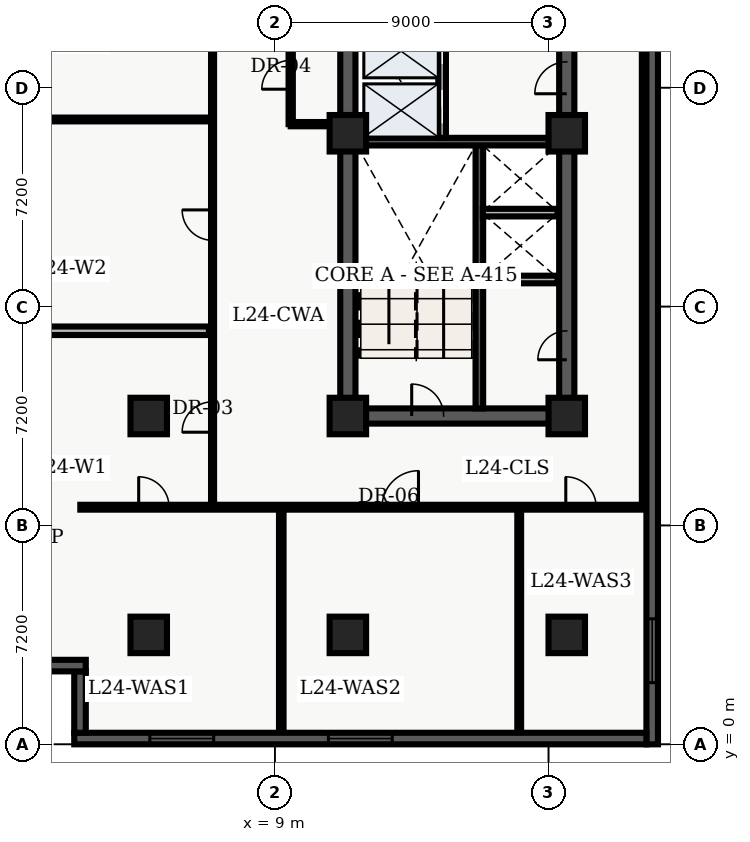
"""IFC4 building model, lengths in metres.
Left out: names, types, materials, properties, quantities, classifications, styles, units other than length and angle.
Written with IfcOpenShell. Run it as: python <this file> out.ifc"""

import sys

from ifc_helpers import new_model, entity, si_unit, converted_unit, direction, frame, origin_with_axes, origin_2d_with_axis, place, context, subcontext, project, spatial, polyline, rectangle, outline, extrude, element, fill, save


model = new_model("IFC4")
c1 = context("Model", 3, precision=1e-05, world=origin_with_axes(), true_north=direction((0.0, 1.0)))
c2 = subcontext(c1, "Body", "Model", "MODEL_VIEW")
j1 = project(units=[si_unit("LENGTHUNIT", "METRE"), converted_unit("PLANEANGLEUNIT", "DEGREE", entity("IfcPlaneAngleMeasure", 0.017), si_unit("PLANEANGLEUNIT", "RADIAN"), dimensions=[0, 0, 0, 0, 0, 0, 0])], contexts=[c1])
p1 = place(None, origin_with_axes())
s1 = spatial("IfcSite", under=j1, at=p1, CompositionType="ELEMENT")
p2 = place(p1, origin_with_axes())
s2 = spatial("IfcBuilding", under=s1, at=p2, CompositionType="ELEMENT")
p3 = place(p2, frame((0.0, 0.0, 100.8), z_axis=(0.0, 0.0, 1.0), x_axis=(1.0, 0.0, 0.0)))
s3 = spatial("IfcBuildingStorey", under=s2, at=p3, CompositionType="ELEMENT", Elevation=100.8)
p4 = place(p3, frame((11.4, 10.8, 0.0), z_axis=(0.0, 0.0, 1.0), x_axis=(0.0, 1.0, 0.0)))
e1 = element("IfcWall", 1, at=p4, inside=s3, PredefinedType="SHEAR", context=c2, shape_type="SweptSolid", body=[
    extrude(outline(polyline([(0.0, -0.25), (27.0, -0.25), (27.0, 0.25), (0.0, 0.25), (0.0, -0.25)])), origin_with_axes(), (0.0, 0.0, 1.0), 3.66),
])
p5 = place(p3, frame((11.4, 10.8, 0.0), z_axis=(0.0, 0.0, 1.0), x_axis=(1.0, 0.0, 0.0)))
e2 = element("IfcWall", 2, at=p5, inside=s3, PredefinedType="SHEAR", context=c2, shape_type="SweptSolid", body=[
    extrude(outline(polyline([(0.0, -0.25), (7.2, -0.25), (7.2, 0.25), (0.0, 0.25), (0.0, -0.25)])), origin_with_axes(), (0.0, 0.0, 1.0), 3.66),
])
p6 = place(p5, frame((2.625, 0.0, 0.0), z_axis=(0.0, 0.0, 1.0), x_axis=(1.0, 0.0, 0.0)))
e3 = element("IfcOpeningElement", 3, at=p6, cuts=e2, PredefinedType="OPENING", context=c2, shape_type="SweptSolid", body=[
    extrude(rectangle(XDim=1.05, YDim=0.52, at=origin_2d_with_axis()), origin_with_axes(), (0.0, 0.0, 1.0), 2.15),
])
p7 = place(p3, frame((18.6, 10.8, 0.0), z_axis=(0.0, 0.0, 1.0), x_axis=(0.0, 1.0, 0.0)))
e4 = element("IfcWall", 4, at=p7, inside=s3, PredefinedType="SHEAR", context=c2, shape_type="SweptSolid", body=[
    extrude(outline(polyline([(0.0, -0.25), (13.5, -0.25), (13.5, 0.25), (0.0, 0.25), (0.0, -0.25)])), origin_with_axes(), (0.0, 0.0, 1.0), 3.66),
])
p8 = place(p7, frame((11.125, 0.0, 0.0), z_axis=(0.0, 0.0, 1.0), x_axis=(1.0, 0.0, 0.0)))
e5 = element("IfcOpeningElement", 5, at=p8, cuts=e4, PredefinedType="OPENING", context=c2, shape_type="SweptSolid", body=[
    extrude(rectangle(XDim=1.05, YDim=0.52, at=origin_2d_with_axis()), origin_with_axes(), (0.0, 0.0, 1.0), 2.15),
])
p9 = place(p7, frame((2.325, 0.0, 0.0), z_axis=(0.0, 0.0, 1.0), x_axis=(1.0, 0.0, 0.0)))
e6 = element("IfcOpeningElement", 6, at=p9, cuts=e4, PredefinedType="OPENING", context=c2, shape_type="SweptSolid", body=[
    extrude(rectangle(XDim=0.95, YDim=0.52, at=origin_2d_with_axis()), origin_with_axes(), (0.0, 0.0, 1.0), 2.15),
])
p10 = place(p3, frame((15.725, 11.05, 0.0), z_axis=(0.0, 0.0, 1.0), x_axis=(0.0, 1.0, 0.0)))
e7 = element("IfcWall", 7, at=p10, inside=s3, PredefinedType="SHEAR", context=c2, shape_type="SweptSolid", body=[
    extrude(outline(polyline([(0.0, -0.125), (8.65, -0.125), (8.65, 0.125), (0.0, 0.125), (0.0, -0.125)])), origin_with_axes(), (0.0, 0.0, 1.0), 3.66),
])
p11 = place(p3, frame((11.65, 19.825, 0.0), z_axis=(0.0, 0.0, 1.0), x_axis=(1.0, 0.0, 0.0)))
e8 = element("IfcWall", 8, at=p11, inside=s3, PredefinedType="SHEAR", context=c2, shape_type="SweptSolid", body=[
    extrude(outline(polyline([(0.0, -0.125), (6.7, -0.125), (6.7, 0.125), (0.0, 0.125), (0.0, -0.125)])), origin_with_axes(), (0.0, 0.0, 1.0), 3.66),
])
p12 = place(p3, frame((14.5, 19.95, 0.0), z_axis=(0.0, 0.0, 1.0), x_axis=(0.0, 1.0, 0.0)))
e9 = element("IfcWall", 9, at=p12, inside=s3, PredefinedType="SOLIDWALL", context=c2, shape_type="SweptSolid", body=[
    extrude(outline(polyline([(0.0, -0.125), (6.25, -0.125), (6.25, 0.125), (0.0, 0.125), (0.0, -0.125)])), origin_with_axes(), (0.0, 0.0, 1.0), 2.7),
])
p13 = place(p12, frame((1.025, 0.0, 0.0), z_axis=(0.0, 0.0, 1.0), x_axis=(1.0, 0.0, 0.0)))
e10 = element("IfcOpeningElement", 10, at=p13, cuts=e9, PredefinedType="OPENING", context=c2, shape_type="SweptSolid", body=[
    extrude(rectangle(XDim=1.1, YDim=0.27, at=origin_2d_with_axis()), origin_with_axes(), (0.0, 0.0, 1.0), 2.15),
])
p14 = place(p12, frame((2.975, 0.0, 0.0), z_axis=(0.0, 0.0, 1.0), x_axis=(1.0, 0.0, 0.0)))
e11 = element("IfcOpeningElement", 11, at=p14, cuts=e9, PredefinedType="OPENING", context=c2, shape_type="SweptSolid", body=[
    extrude(rectangle(XDim=1.1, YDim=0.27, at=origin_2d_with_axis()), origin_with_axes(), (0.0, 0.0, 1.0), 2.15),
])
p15 = place(p12, frame((5.425, 0.0, 0.0), z_axis=(0.0, 0.0, 1.0), x_axis=(1.0, 0.0, 0.0)))
e12 = element("IfcOpeningElement", 12, at=p15, cuts=e9, PredefinedType="OPENING", context=c2, shape_type="SweptSolid", body=[
    extrude(rectangle(XDim=1.2, YDim=0.27, at=origin_2d_with_axis()), origin_with_axes(), (0.0, 0.0, 1.0), 2.15),
])
for number, where, z_axis, x_axis in (
    (13, (11.4, 3.6, 0.0), (0.0, 0.0, 1.0), (1.0, 0.0, 0.0)),
    (14, (11.4, 10.8, 0.0), (0.0, 0.0, 1.0), (1.0, 0.0, 0.0)),
    (15, (11.4, 20.1, 0.0), (0.0, 0.0, 1.0), (1.0, 0.0, 0.0)),
    (16, (18.6, 3.6, 0.0), (0.0, 0.0, 1.0), (1.0, 0.0, 0.0)),
    (17, (18.6, 10.8, 0.0), (0.0, 0.0, 1.0), (1.0, 0.0, 0.0)),
    (18, (18.6, 20.1, 0.0), (0.0, 0.0, 1.0), (1.0, 0.0, 0.0)),
    (19, (4.85, 3.6, 0.0), (0.0, 0.0, 1.0), (1.0, 0.0, 0.0)),
    (20, (4.85, 10.8, 0.0), (0.0, 0.0, 1.0), (1.0, 0.0, 0.0)),
):
    element("IfcColumn", number, at=place(p3, frame(where, z_axis=z_axis, x_axis=x_axis)), inside=s3, PredefinedType="COLUMN", context=c2, shape_type="SweptSolid", body=[
        extrude(rectangle(XDim=1.2, YDim=1.2, at=origin_2d_with_axis()), origin_with_axes(), (0.0, 0.0, 1.0), 3.9),
    ])
for number, where, z_axis, x_axis in (
    (21, (15.84, 15.29, 0.0), (0.0, 0.0, 1.0), (1.0, 0.0, 0.0)),
    (22, (15.84, 17.49, 0.0), (0.0, 0.0, 1.0), (1.0, 0.0, 0.0)),
):
    element("IfcWall", number, at=place(p3, frame(where, z_axis=z_axis, x_axis=x_axis)), inside=s3, PredefinedType="SOLIDWALL", context=c2, shape_type="SweptSolid", body=[
        extrude(outline(polyline([(0.0, -0.125), (2.46, -0.125), (2.46, 0.125), (0.0, 0.125), (0.0, -0.125)])), origin_with_axes(), (0.0, 0.0, 1.0), 2.7),
    ])
p16 = place(p3, frame((9.52, 20.4, 0.0), z_axis=(0.0, 0.0, 1.0), x_axis=(0.0, 1.0, 0.0)))
e23 = element("IfcWall", 23, at=p16, inside=s3, PredefinedType="PARTITIONING", context=c2, shape_type="SweptSolid", body=[
    extrude(outline(polyline([(0.0, -0.07), (4.0, -0.07), (4.0, 0.07), (0.0, 0.07), (0.0, -0.07)])), origin_with_axes(), (0.0, 0.0, 1.0), 2.7),
])
p17 = place(p16, frame((1.625, 0.0, 0.0), z_axis=(0.0, 0.0, 1.0), x_axis=(1.0, 0.0, 0.0)))
e24 = element("IfcOpeningElement", 24, at=p17, cuts=e23, PredefinedType="OPENING", context=c2, shape_type="SweptSolid", body=[
    extrude(rectangle(XDim=0.95, YDim=0.16, at=origin_2d_with_axis()), origin_with_axes(), (0.0, 0.0, 1.0), 2.15),
])
p18 = place(p3, frame((9.52, 20.4, 0.0), z_axis=(0.0, 0.0, 1.0), x_axis=(1.0, 0.0, 0.0)))
e25 = element("IfcWall", 25, at=p18, inside=s3, PredefinedType="PARTITIONING", context=c2, shape_type="SweptSolid", body=[
    extrude(outline(polyline([(0.0, -0.07), (1.58, -0.07), (1.58, 0.07), (0.0, 0.07), (0.0, -0.07)])), origin_with_axes(), (0.0, 0.0, 1.0), 2.7),
])
p19 = place(p3, frame((2.6, 7.8, 0.0), z_axis=(0.0, 0.0, 1.0), x_axis=(1.0, 0.0, 0.0)))
e26 = element("IfcWall", 26, at=p19, inside=s3, PredefinedType="PARTITIONING", context=c2, shape_type="SweptSolid", body=[
    extrude(outline(polyline([(0.0, -0.08), (18.625, -0.08), (18.625, 0.08), (0.0, 0.08), (0.0, -0.08)])), origin_with_axes(), (0.0, 0.0, 1.0), 2.7),
])
p20 = place(p19, frame((2.42, 0.0, 0.0), z_axis=(0.0, 0.0, 1.0), x_axis=(1.0, 0.0, 0.0)))
e27 = element("IfcOpeningElement", 27, at=p20, cuts=e26, PredefinedType="OPENING", context=c2, shape_type="SweptSolid", body=[
    extrude(rectangle(XDim=1.0, YDim=0.18, at=origin_2d_with_axis()), origin_with_axes(), (0.0, 0.0, 1.0), 2.15),
])
p21 = place(p19, frame((10.523, 0.0, 0.0), z_axis=(0.0, 0.0, 1.0), x_axis=(1.0, 0.0, 0.0)))
e28 = element("IfcOpeningElement", 28, at=p21, cuts=e26, PredefinedType="OPENING", context=c2, shape_type="SweptSolid", body=[
    extrude(rectangle(XDim=1.2, YDim=0.18, at=origin_2d_with_axis()), origin_with_axes(), (0.0, 0.0, 1.0), 2.2),
])
p22 = place(p19, frame((16.468, 0.0, 0.0), z_axis=(0.0, 0.0, 1.0), x_axis=(1.0, 0.0, 0.0)))
e29 = element("IfcOpeningElement", 29, at=p22, cuts=e26, PredefinedType="OPENING", context=c2, shape_type="SweptSolid", body=[
    extrude(rectangle(XDim=1.0, YDim=0.18, at=origin_2d_with_axis()), origin_with_axes(), (0.0, 0.0, 1.0), 2.15),
])
p23 = place(p3, frame((21.15, 7.8, 0.0), z_axis=(0.0, 0.0, 1.0), x_axis=(0.0, 1.0, 0.0)))
e30 = element("IfcWall", 30, at=p23, inside=s3, PredefinedType="PARTITIONING", context=c2, shape_type="SweptSolid", body=[
    extrude(outline(polyline([(0.0, -0.08), (32.7, -0.08), (32.7, 0.08), (0.0, 0.08), (0.0, -0.08)])), origin_with_axes(), (0.0, 0.0, 1.0), 2.7),
])
p24 = place(p3, frame((6.95, 7.8, 0.0), z_axis=(0.0, 0.0, 1.0), x_axis=(0.0, 1.0, 0.0)))
e31 = element("IfcWall", 31, at=p24, inside=s3, PredefinedType="PARTITIONING", context=c2, shape_type="SweptSolid", body=[
    extrude(outline(polyline([(0.0, -0.05), (32.7, -0.05), (32.7, 0.05), (0.0, 0.05), (0.0, -0.05)])), origin_with_axes(), (0.0, 0.0, 1.0), 2.7),
])
p25 = place(p24, frame((2.967, 0.0, 0.0), z_axis=(0.0, 0.0, 1.0), x_axis=(1.0, 0.0, 0.0)))
e32 = element("IfcOpeningElement", 32, at=p25, cuts=e31, PredefinedType="OPENING", context=c2, shape_type="SweptSolid", body=[
    extrude(rectangle(XDim=1.0, YDim=0.12, at=origin_2d_with_axis()), origin_with_axes(), (0.0, 0.0, 1.0), 2.15),
])
p26 = place(p24, frame((9.279, 0.0, 0.0), z_axis=(0.0, 0.0, 1.0), x_axis=(1.0, 0.0, 0.0)))
e33 = element("IfcOpeningElement", 33, at=p26, cuts=e31, PredefinedType="OPENING", context=c2, shape_type="SweptSolid", body=[
    extrude(rectangle(XDim=1.0, YDim=0.12, at=origin_2d_with_axis()), origin_with_axes(), (0.0, 0.0, 1.0), 2.15),
])
p27 = place(p24, frame((17.202, 0.0, 0.0), z_axis=(0.0, 0.0, 1.0), x_axis=(1.0, 0.0, 0.0)))
e34 = element("IfcOpeningElement", 34, at=p27, cuts=e31, PredefinedType="OPENING", context=c2, shape_type="SweptSolid", body=[
    extrude(rectangle(XDim=1.0, YDim=0.12, at=origin_2d_with_axis()), origin_with_axes(), (0.0, 0.0, 1.0), 2.15),
])
p28 = place(p24, frame((27.11, 0.0, 0.0), z_axis=(0.0, 0.0, 1.0), x_axis=(1.0, 0.0, 0.0)))
e35 = element("IfcOpeningElement", 35, at=p28, cuts=e31, PredefinedType="OPENING", context=c2, shape_type="SweptSolid", body=[
    extrude(rectangle(XDim=1.0, YDim=0.12, at=origin_2d_with_axis()), origin_with_axes(), (0.0, 0.0, 1.0), 2.15),
])
p29 = place(p3, frame((0.375, 13.604, 0.0), z_axis=(0.0, 0.0, 1.0), x_axis=(1.0, 0.0, 0.0)))
e36 = element("IfcWall", 36, at=p29, inside=s3, PredefinedType="PARTITIONING", context=c2, shape_type="SweptSolid", body=[
    extrude(outline(polyline([(0.0, -0.14), (6.455, -0.14), (6.455, 0.14), (0.0, 0.14), (0.0, -0.14)])), origin_with_axes(), (0.0, 0.0, 1.0), 2.7),
])
p30 = place(p3, frame((0.375, 20.554, 0.0), z_axis=(0.0, 0.0, 1.0), x_axis=(1.0, 0.0, 0.0)))
e37 = element("IfcWall", 37, at=p30, inside=s3, PredefinedType="PARTITIONING", context=c2, shape_type="SweptSolid", body=[
    extrude(outline(polyline([(0.0, -0.062), (6.455, -0.062), (6.455, 0.062), (0.0, 0.062), (0.0, -0.062)])), origin_with_axes(), (0.0, 0.0, 1.0), 2.7),
])
p31 = place(p3, frame((9.21, 0.36, 0.0), z_axis=(0.0, 0.0, 1.0), x_axis=(0.0, 1.0, 0.0)))
e38 = element("IfcWall", 38, at=p31, inside=s3, PredefinedType="PARTITIONING", context=c2, shape_type="SweptSolid", body=[
    extrude(outline(polyline([(0.0, -0.075), (7.34, -0.075), (7.34, 0.075), (0.0, 0.075), (0.0, -0.075)])), origin_with_axes(), (0.0, 0.0, 1.0), 2.7),
])
p32 = place(p3, frame((17.036, 0.36, 0.0), z_axis=(0.0, 0.0, 1.0), x_axis=(0.0, 1.0, 0.0)))
e39 = element("IfcWall", 39, at=p32, inside=s3, PredefinedType="PARTITIONING", context=c2, shape_type="SweptSolid", body=[
    extrude(outline(polyline([(0.0, -0.062), (7.34, -0.062), (7.34, 0.062), (0.0, 0.062), (0.0, -0.062)])), origin_with_axes(), (0.0, 0.0, 1.0), 2.7),
])
p33 = place(p3, frame((21.41, 45.82, 0.0), z_axis=(0.0, 0.0, 1.0), x_axis=(0.0, -1.0, 0.0)))
e40 = element("IfcWall", 40, at=p33, inside=s3, PredefinedType="SOLIDWALL", context=c2, shape_type="SweptSolid", body=[
    extrude(outline(polyline([(0.0, -0.19), (45.82, -0.19), (45.82, 0.19), (0.0, 0.19), (0.0, -0.19)])), origin_with_axes(), (0.0, 0.0, 1.0), 3.66),
])
p34 = place(p33, frame((3.079, 0.0, 0.45), z_axis=(0.0, 0.0, 1.0), x_axis=(1.0, 0.0, 0.0)))
e41 = element("IfcOpeningElement", 41, at=p34, cuts=e40, PredefinedType="OPENING", context=c2, shape_type="SweptSolid", body=[
    extrude(rectangle(XDim=2.1, YDim=0.4, at=origin_2d_with_axis()), origin_with_axes(), (0.0, 0.0, 1.0), 2.2),
])
p35 = place(p33, frame((42.741, 0.0, 0.45), z_axis=(0.0, 0.0, 1.0), x_axis=(1.0, 0.0, 0.0)))
e42 = element("IfcOpeningElement", 42, at=p35, cuts=e40, PredefinedType="OPENING", context=c2, shape_type="SweptSolid", body=[
    extrude(rectangle(XDim=2.1, YDim=0.4, at=origin_2d_with_axis()), origin_with_axes(), (0.0, 0.0, 1.0), 2.2),
])
p36 = place(p3, frame((21.22, 0.19, 0.0), z_axis=(0.0, 0.0, 1.0), x_axis=(-1.0, 0.0, 0.0)))
e43 = element("IfcWall", 43, at=p36, inside=s3, PredefinedType="SOLIDWALL", context=c2, shape_type="SweptSolid", body=[
    extrude(outline(polyline([(0.0, -0.19), (18.82, -0.19), (18.82, 0.19), (0.0, 0.19), (0.0, -0.19)])), origin_with_axes(), (0.0, 0.0, 1.0), 3.66),
])
p37 = place(p36, frame((9.41, 0.0, 0.45), z_axis=(0.0, 0.0, 1.0), x_axis=(1.0, 0.0, 0.0)))
e44 = element("IfcOpeningElement", 44, at=p37, cuts=e43, PredefinedType="OPENING", context=c2, shape_type="SweptSolid", body=[
    extrude(rectangle(XDim=2.1, YDim=0.4, at=origin_2d_with_axis()), origin_with_axes(), (0.0, 0.0, 1.0), 2.2),
])
p38 = place(p36, frame((15.283, 0.0, 0.45), z_axis=(0.0, 0.0, 1.0), x_axis=(1.0, 0.0, 0.0)))
e45 = element("IfcOpeningElement", 45, at=p38, cuts=e43, PredefinedType="OPENING", context=c2, shape_type="SweptSolid", body=[
    extrude(rectangle(XDim=2.1, YDim=0.4, at=origin_2d_with_axis()), origin_with_axes(), (0.0, 0.0, 1.0), 2.2),
])
p39 = place(p3, frame((2.59, 0.38, 0.0), z_axis=(0.0, 0.0, 1.0), x_axis=(0.0, 1.0, 0.0)))
e46 = element("IfcWall", 46, at=p39, inside=s3, PredefinedType="SOLIDWALL", context=c2, shape_type="SweptSolid", body=[
    extrude(outline(polyline([(0.0, -0.19), (2.02, -0.19), (2.02, 0.19), (0.0, 0.19), (0.0, -0.19)])), origin_with_axes(), (0.0, 0.0, 1.0), 3.66),
])
p40 = place(p3, frame((2.78, 2.59, 0.0), z_axis=(0.0, 0.0, 1.0), x_axis=(-1.0, 0.0, 0.0)))
e47 = element("IfcWall", 47, at=p40, inside=s3, PredefinedType="SOLIDWALL", context=c2, shape_type="SweptSolid", body=[
    extrude(outline(polyline([(0.0, -0.19), (2.78, -0.19), (2.78, 0.19), (0.0, 0.19), (0.0, -0.19)])), origin_with_axes(), (0.0, 0.0, 1.0), 3.66),
])
p41 = place(p12, frame((1.025, 0.0, 0.0), z_axis=(0.0, 0.0, 1.0), x_axis=(1.0, 0.0, 0.0)))
e48 = element("IfcDoor", 48, at=p41, inside=s3, OperationType="SLIDING_TO_LEFT", PredefinedType="DOOR", context=c2, shape_type="SweptSolid", body=[
    extrude(rectangle(XDim=1.1, YDim=0.09, at=origin_2d_with_axis()), origin_with_axes(), (0.0, 0.0, 1.0), 2.15),
])
fill(e10, e48)
p42 = place(p12, frame((2.975, 0.0, 0.0), z_axis=(0.0, 0.0, 1.0), x_axis=(1.0, 0.0, 0.0)))
e49 = element("IfcDoor", 49, at=p42, inside=s3, OperationType="SLIDING_TO_RIGHT", PredefinedType="DOOR", context=c2, shape_type="SweptSolid", body=[
    extrude(rectangle(XDim=1.1, YDim=0.09, at=origin_2d_with_axis()), origin_with_axes(), (0.0, 0.0, 1.0), 2.15),
])
fill(e11, e49)
p43 = place(p5, frame((2.625, 0.0, 0.0), z_axis=(0.0, 0.0, 1.0), x_axis=(1.0, 0.0, 0.0)))
e50 = element("IfcDoor", 50, at=p43, inside=s3, OperationType="SINGLE_SWING_LEFT", PredefinedType="DOOR", context=c2, shape_type="SweptSolid", body=[
    extrude(rectangle(XDim=1.05, YDim=0.09, at=origin_2d_with_axis()), origin_with_axes(), (0.0, 0.0, 1.0), 2.15),
])
fill(e3, e50)
p44 = place(p7, frame((11.125, 0.0, 0.0), z_axis=(0.0, 0.0, 1.0), x_axis=(1.0, 0.0, 0.0)))
e51 = element("IfcDoor", 51, at=p44, inside=s3, OperationType="SINGLE_SWING_LEFT", PredefinedType="DOOR", context=c2, shape_type="SweptSolid", body=[
    extrude(rectangle(XDim=1.05, YDim=0.09, at=origin_2d_with_axis()), origin_with_axes(), (0.0, 0.0, 1.0), 2.15),
])
fill(e5, e51)
p45 = place(p7, frame((2.325, 0.0, 0.0), z_axis=(0.0, 0.0, 1.0), x_axis=(1.0, 0.0, 0.0)))
e52 = element("IfcDoor", 52, at=p45, inside=s3, OperationType="SINGLE_SWING_LEFT", PredefinedType="DOOR", context=c2, shape_type="SweptSolid", body=[
    extrude(rectangle(XDim=0.95, YDim=0.09, at=origin_2d_with_axis()), origin_with_axes(), (0.0, 0.0, 1.0), 2.15),
])
fill(e6, e52)
p46 = place(p16, frame((1.625, 0.0, 0.0), z_axis=(0.0, 0.0, 1.0), x_axis=(1.0, 0.0, 0.0)))
e53 = element("IfcDoor", 53, at=p46, inside=s3, OperationType="SINGLE_SWING_LEFT", PredefinedType="DOOR", context=c2, shape_type="SweptSolid", body=[
    extrude(rectangle(XDim=0.95, YDim=0.084, at=origin_2d_with_axis()), origin_with_axes(), (0.0, 0.0, 1.0), 2.15),
])
fill(e24, e53)
p47 = place(p24, frame((2.967, 0.0, 0.0), z_axis=(0.0, 0.0, 1.0), x_axis=(1.0, 0.0, 0.0)))
e54 = element("IfcDoor", 54, at=p47, inside=s3, OperationType="SINGLE_SWING_LEFT", PredefinedType="DOOR", context=c2, shape_type="SweptSolid", body=[
    extrude(rectangle(XDim=1.0, YDim=0.06, at=origin_2d_with_axis()), origin_with_axes(), (0.0, 0.0, 1.0), 2.15),
])
fill(e32, e54)
p48 = place(p24, frame((9.279, 0.0, 0.0), z_axis=(0.0, 0.0, 1.0), x_axis=(1.0, 0.0, 0.0)))
e55 = element("IfcDoor", 55, at=p48, inside=s3, OperationType="SINGLE_SWING_RIGHT", PredefinedType="DOOR", context=c2, shape_type="SweptSolid", body=[
    extrude(rectangle(XDim=1.0, YDim=0.06, at=origin_2d_with_axis()), origin_with_axes(), (0.0, 0.0, 1.0), 2.15),
])
fill(e33, e55)
p49 = place(p19, frame((2.42, 0.0, 0.0), z_axis=(0.0, 0.0, 1.0), x_axis=(1.0, 0.0, 0.0)))
e56 = element("IfcDoor", 56, at=p49, inside=s3, OperationType="SINGLE_SWING_LEFT", PredefinedType="DOOR", context=c2, shape_type="SweptSolid", body=[
    extrude(rectangle(XDim=1.0, YDim=0.09, at=origin_2d_with_axis()), origin_with_axes(), (0.0, 0.0, 1.0), 2.15),
])
fill(e27, e56)
p50 = place(p19, frame((10.523, 0.0, 0.0), z_axis=(0.0, 0.0, 1.0), x_axis=(1.0, 0.0, 0.0)))
e57 = element("IfcDoor", 57, at=p50, inside=s3, OperationType="SINGLE_SWING_RIGHT", PredefinedType="DOOR", context=c2, shape_type="SweptSolid", body=[
    extrude(rectangle(XDim=1.2, YDim=0.09, at=origin_2d_with_axis()), origin_with_axes(), (0.0, 0.0, 1.0), 2.2),
])
fill(e28, e57)
p51 = place(p19, frame((16.468, 0.0, 0.0), z_axis=(0.0, 0.0, 1.0), x_axis=(1.0, 0.0, 0.0)))
e58 = element("IfcDoor", 58, at=p51, inside=s3, OperationType="SINGLE_SWING_LEFT", PredefinedType="DOOR", context=c2, shape_type="SweptSolid", body=[
    extrude(rectangle(XDim=1.0, YDim=0.09, at=origin_2d_with_axis()), origin_with_axes(), (0.0, 0.0, 1.0), 2.15),
])
fill(e29, e58)
p52 = place(p33, frame((42.741, 0.0, 0.45), z_axis=(0.0, 0.0, 1.0), x_axis=(1.0, 0.0, 0.0)))
e59 = element("IfcWindow", 59, at=p52, inside=s3, PredefinedType="WINDOW", context=c2, shape_type="SweptSolid", body=[
    extrude(rectangle(XDim=2.1, YDim=0.09, at=origin_2d_with_axis()), origin_with_axes(), (0.0, 0.0, 1.0), 2.2),
])
fill(e42, e59)
p53 = place(p36, frame((9.41, 0.0, 0.45), z_axis=(0.0, 0.0, 1.0), x_axis=(1.0, 0.0, 0.0)))
e60 = element("IfcWindow", 60, at=p53, inside=s3, PredefinedType="WINDOW", context=c2, shape_type="SweptSolid", body=[
    extrude(rectangle(XDim=2.1, YDim=0.09, at=origin_2d_with_axis()), origin_with_axes(), (0.0, 0.0, 1.0), 2.2),
])
fill(e44, e60)
p54 = place(p36, frame((15.283, 0.0, 0.45), z_axis=(0.0, 0.0, 1.0), x_axis=(1.0, 0.0, 0.0)))
e61 = element("IfcWindow", 61, at=p54, inside=s3, PredefinedType="WINDOW", context=c2, shape_type="SweptSolid", body=[
    extrude(rectangle(XDim=2.1, YDim=0.09, at=origin_2d_with_axis()), origin_with_axes(), (0.0, 0.0, 1.0), 2.2),
])
fill(e45, e61)
save(model, sys.argv[1])
